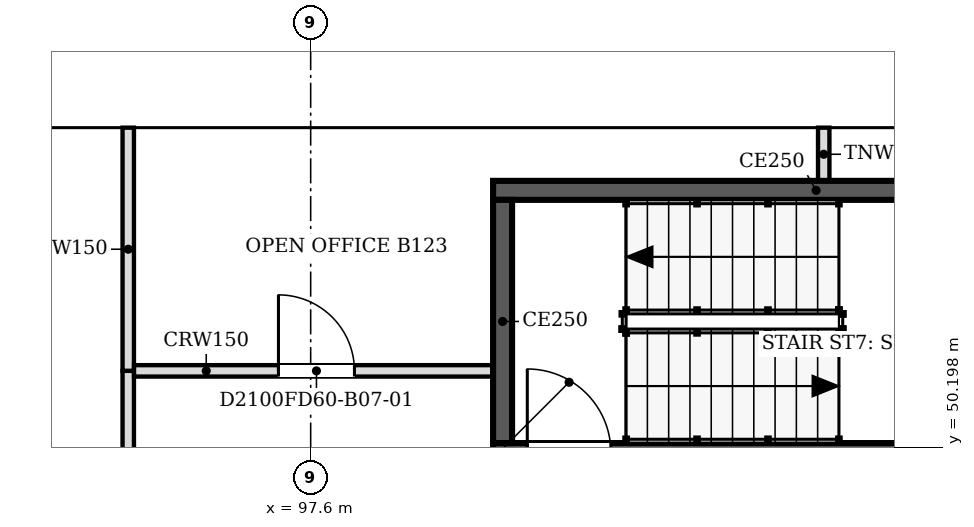
"""IFC4 building model, lengths in metres.
Left out: names, types, materials, properties, quantities, classifications, styles, units other than length and angle.
Written with IfcOpenShell. Run it as: python <this file> out.ifc"""

import sys

from ifc_helpers import new_model, si_unit, direction, frame, frame_2d, origin, place, context, subcontext, project, spatial, polyline, rectangle, outline, extrude, faceted_brep, source, transform, mapped, element, fill, save


model = new_model("IFC4")
c1 = context("Model", 3, precision=1e-05, world=origin(), true_north=direction((0.0, 1.0)))
c2 = subcontext(c1, "Body", "Model", "MODEL_VIEW")
j1 = project(units=[si_unit("LENGTHUNIT", "METRE"), si_unit("PLANEANGLEUNIT", "RADIAN")], contexts=[c1])
p1 = place(None, origin())
s1 = spatial("IfcSite", under=j1, at=p1, CompositionType="ELEMENT")
p2 = place(p1, origin())
s2 = spatial("IfcBuilding", under=s1, at=p2, CompositionType="ELEMENT")
p3 = place(p2, frame((0.0, 0.0, 68.6)))
s3 = spatial("IfcBuildingStorey", under=s2, at=p3, CompositionType="ELEMENT", Elevation=68.6)
m1 = source(origin(), c2, "Body", "SweptSolid", [
    extrude(outline(polyline([(6.1, 0.0), (3.05, 3.8), (0.0, 0.0), (6.1, 0.0)])), frame((0.0, 0.25, 0.0), z_axis=(0.0, -1.0, 0.0), x_axis=(1.0, 0.0, 0.0)), (0.0, 0.0, 1.0), 0.5),
])
p4 = place(p3, frame((106.75, 54.65, 0.0), z_axis=(0.0, 0.0, 1.0), x_axis=(-1.0, 0.0, 0.0)))
e1 = element("IfcWall", 1, at=p4, inside=s3, PredefinedType="SOLIDWALL", context=c2, shape_type="MappedRepresentation", body=[
    mapped(m1, transform((0.0, 0.0, 0.0), scale=1.0)),
])
m2 = source(origin(), c2, "Body", "SweptSolid", [
    extrude(outline(polyline([(5.579, 0.25), (3.05, 3.4), (0.521, 0.25), (5.579, 0.25)])), frame((0.0, 0.26, 0.0), z_axis=(0.0, -1.0, 0.0), x_axis=(1.0, 0.0, 0.0)), (0.0, 0.0, 1.0), 0.52),
])
p5 = place(p4, origin())
e2 = element("IfcOpeningElement", 2, at=p5, cuts=e1, PredefinedType="OPENING", context=c2, shape_type="MappedRepresentation", body=[
    mapped(m2, transform((0.0, 0.0, 0.0), scale=1.0)),
])
m3 = source(origin(), c2, "Body", "Brep", [
    faceted_brep([(6.1, -0.25, 0.0), (3.05, -0.25, 3.8), (0.0, -0.25, 0.0), (6.1, -0.25, 0.0), (0.0, 0.25, 0.0), (3.05, 0.25, 3.8), (6.1, 0.25, 0.0), (6.1, 0.25, 0.0)], [[[0, 1, 2, 3]], [[4, 5, 6, 7]], [[6, 5, 1, 0]], [[5, 4, 2, 1]], [[4, 7, 3, 2]], [[3, 7, 6, 0]]]),
])
p6 = place(p3, frame((100.65, 54.65, 0.0), z_axis=(0.0, 0.0, 1.0), x_axis=(-1.0, 0.0, 0.0)))
e3 = element("IfcWall", 3, at=p6, inside=s3, PredefinedType="SOLIDWALL", context=c2, shape_type="MappedRepresentation", body=[
    mapped(m3, transform((0.0, 0.0, 0.0), scale=1.0)),
])
p7 = place(p6, origin())
e4 = element("IfcOpeningElement", 4, at=p7, cuts=e3, PredefinedType="OPENING", context=c2, shape_type="MappedRepresentation", body=[
    mapped(m2, transform((0.0, 0.0, 0.0), scale=1.0)),
])
m4 = source(origin(), c2, "Body", "Brep", [
    faceted_brep([(3.05, -0.25, 3.74), (3.003, -0.25, 3.8), (0.0, -0.25, 0.0), (3.05, -0.25, 0.0), (0.0, 0.25, 0.0), (2.957, 0.25, 3.741), (2.957, 0.25, 0.0), (3.003, 0.0, 3.8)], [[[0, 1, 2, 3]], [[4, 5, 6]], [[7, 1, 0]], [[5, 4, 2, 1, 7]], [[4, 6, 3, 2]], [[3, 6, 5, 7, 0]]]),
])
p8 = place(p3, frame((94.55, 54.65, 0.0), z_axis=(0.0, 0.0, 1.0), x_axis=(-1.0, 0.0, 0.0)))
e5 = element("IfcWall", 5, at=p8, inside=s3, PredefinedType="SOLIDWALL", context=c2, shape_type="MappedRepresentation", body=[
    mapped(m4, transform((0.0, 0.0, 0.0), scale=1.0)),
])
m5 = source(origin(), c2, "Body", "SweptSolid", [
    extrude(outline(polyline([(2.803, 3.144), (0.516, 0.25), (2.803, 0.25), (2.803, 3.144)])), frame((0.0, 0.26, 0.0), z_axis=(0.0, -1.0, 0.0), x_axis=(1.0, 0.0, 0.0)), (0.0, 0.0, 1.0), 0.52),
])
p9 = place(p8, origin())
e6 = element("IfcOpeningElement", 6, at=p9, cuts=e5, PredefinedType="OPENING", context=c2, shape_type="MappedRepresentation", body=[
    mapped(m5, transform((0.0, 0.0, 0.0), scale=1.0)),
])
p10 = place(p2, frame((0.0, 0.0, 72.4)))
s4 = spatial("IfcBuildingStorey", under=s2, at=p10, CompositionType="ELEMENT", Elevation=72.4)
m6 = source(origin(), c2, "Body", "SweptSolid", [
    extrude(outline(polyline([(3.05, 0.0), (6.1, 3.8), (3.05, 7.6), (0.0, 3.8), (3.05, 0.0)])), frame((0.0, 0.25, 0.0), z_axis=(0.0, -1.0, 0.0), x_axis=(1.0, 0.0, 0.0)), (0.0, 0.0, 1.0), 0.5),
])
p11 = place(p10, frame((109.8, 54.65, -3.8), z_axis=(0.0, 0.0, 1.0), x_axis=(-1.0, 0.0, 0.0)))
e7 = element("IfcWall", 7, at=p11, inside=s4, PredefinedType="SOLIDWALL", context=c2, shape_type="MappedRepresentation", body=[
    mapped(m6, transform((0.0, 0.0, 0.0), scale=1.0)),
])
m7 = source(origin(), c2, "Body", "SweptSolid", [
    extrude(outline(polyline([(3.05, 0.399), (5.78, 3.8), (3.05, 7.2), (0.321, 3.8), (3.05, 0.399)])), frame((0.0, 0.26, 0.0), z_axis=(0.0, -1.0, 0.0), x_axis=(1.0, 0.0, 0.0)), (0.0, 0.0, 1.0), 0.52),
])
p12 = place(p11, origin())
e8 = element("IfcOpeningElement", 8, at=p12, cuts=e7, PredefinedType="OPENING", context=c2, shape_type="MappedRepresentation", body=[
    mapped(m7, transform((0.0, 0.0, 0.0), scale=1.0)),
])
m8 = source(origin(), c2, "Body", "Brep", [
    faceted_brep([(3.05, -0.25, 0.0), (6.1, -0.25, 3.8), (6.1, -0.25, 3.8), (3.05, -0.25, 7.6), (0.0, -0.25, 3.8), (0.0, 0.25, 3.8), (3.05, 0.25, 7.6), (6.1, 0.25, 3.8), (6.1, 0.25, 3.8), (3.05, 0.25, 0.0)], [[[0, 1, 2, 3, 4]], [[5, 6, 7, 8, 9]], [[9, 8, 1, 0]], [[7, 6, 3, 2]], [[6, 5, 4, 3]], [[5, 9, 0, 4]], [[1, 8, 7, 2]]]),
])
p13 = place(p10, frame((103.7, 54.65, -3.8), z_axis=(0.0, 0.0, 1.0), x_axis=(-1.0, 0.0, 0.0)))
e9 = element("IfcWall", 9, at=p13, inside=s4, PredefinedType="SOLIDWALL", context=c2, shape_type="MappedRepresentation", body=[
    mapped(m8, transform((0.0, 0.0, 0.0), scale=1.0)),
])
p14 = place(p13, origin())
e10 = element("IfcOpeningElement", 10, at=p14, cuts=e9, PredefinedType="OPENING", context=c2, shape_type="MappedRepresentation", body=[
    mapped(m7, transform((0.0, 0.0, 0.0), scale=1.0)),
])
m9 = source(origin(), c2, "Body", "Brep", [
    faceted_brep([(3.05, -0.25, 0.0), (6.053, -0.25, 3.8), (3.05, -0.25, 7.6), (0.0, -0.25, 3.8), (0.0, 0.25, 3.8), (3.05, 0.25, 7.6), (6.007, 0.25, 3.859), (6.007, 0.25, 3.741), (3.05, 0.25, 0.0), (6.053, 0.0, 3.8)], [[[0, 1, 2, 3]], [[4, 5, 6, 7, 8]], [[8, 7, 9, 1, 0]], [[6, 5, 2, 1, 9]], [[5, 4, 3, 2]], [[4, 8, 0, 3]], [[9, 7, 6]]]),
])
p15 = place(p10, frame((97.6, 54.65, -3.8), z_axis=(0.0, 0.0, 1.0), x_axis=(-1.0, 0.0, 0.0)))
e11 = element("IfcWall", 11, at=p15, inside=s4, PredefinedType="SOLIDWALL", context=c2, shape_type="MappedRepresentation", body=[
    mapped(m9, transform((0.0, 0.0, 0.0), scale=1.0)),
])
m10 = source(origin(), c2, "Body", "SweptSolid", [
    extrude(outline(polyline([(3.049, 0.401), (5.735, 3.8), (3.049, 7.199), (0.321, 3.8), (3.049, 0.401)])), frame((0.0, 0.26, 0.0), z_axis=(0.0, -1.0, 0.0), x_axis=(1.0, 0.0, 0.0)), (0.0, 0.0, 1.0), 0.52),
])
p16 = place(p15, origin())
e12 = element("IfcOpeningElement", 12, at=p16, cuts=e11, PredefinedType="OPENING", context=c2, shape_type="MappedRepresentation", body=[
    mapped(m10, transform((0.0, 0.0, 0.0), scale=1.0)),
])
p17 = place(p3, frame((108.5, 50.125, 0.0), z_axis=(0.0, 0.0, 1.0), x_axis=(-1.0, 0.0, 0.0)))
e13 = element("IfcWall", 13, at=p17, inside=s3, PredefinedType="SOLIDWALL", context=c2, shape_type="SweptSolid", body=[
    extrude(rectangle(XDim=8.5, YDim=0.25, at=frame_2d((4.25, 0.0))), origin(), (0.0, 0.0, 1.0), 3.8),
])
m11 = source(origin(), c2, "Body", "SweptSolid", [
    extrude(rectangle(XDim=1.1, YDim=2.1, at=frame_2d((0.55, 1.05))), frame((0.0, 0.135, 0.0), z_axis=(0.0, -1.0, 0.0), x_axis=(1.0, 0.0, 0.0)), (0.0, 0.0, 1.0), 0.27),
])
p18 = place(p17, frame((6.95, 0.0, 0.0)))
e14 = element("IfcOpeningElement", 14, at=p18, cuts=e13, PredefinedType="OPENING", context=c2, shape_type="MappedRepresentation", body=[
    mapped(m11, transform((0.0, 0.0, 0.0), scale=1.0)),
])
p19 = place(p3, frame((100.125, 50.25, 0.0), z_axis=(0.0, 0.0, 1.0), x_axis=(0.0, 1.0, 0.0)))
e15 = element("IfcWall", 15, at=p19, inside=s3, PredefinedType="SOLIDWALL", context=c2, shape_type="SweptSolid", body=[
    extrude(rectangle(XDim=3.2, YDim=0.25, at=frame_2d((1.6, 0.0))), origin(), (0.0, 0.0, 1.0), 3.8),
])
p20 = place(p3, frame((100.0, 53.575, 0.0), z_axis=(0.0, 0.0, 1.0), x_axis=(1.0, 0.0, 0.0)))
e16 = element("IfcWall", 16, at=p20, inside=s3, PredefinedType="SOLIDWALL", context=c2, shape_type="SweptSolid", body=[
    extrude(rectangle(XDim=8.5, YDim=0.25, at=frame_2d((4.25, 0.0))), origin(), (0.0, 0.0, 1.0), 3.8),
])
p21 = place(p3, frame((95.2, 36.6, 0.0), z_axis=(0.0, 0.0, 1.0), x_axis=(0.0, 1.0, 0.0)))
e17 = element("IfcWall", 17, at=p21, inside=s3, PredefinedType="PARTITIONING", context=c2, shape_type="SweptSolid", body=[
    extrude(rectangle(XDim=14.6, YDim=0.15, at=frame_2d((7.3, 0.0))), origin(), (0.0, 0.0, 1.0), 3.067),
])
m12 = source(origin(), c2, "Body", "SweptSolid", [
    extrude(rectangle(XDim=0.9, YDim=2.1, at=frame_2d((0.45, 1.05))), frame((0.0, 0.085, 0.0), z_axis=(0.0, -1.0, 0.0), x_axis=(1.0, 0.0, 0.0)), (0.0, 0.0, 1.0), 0.17),
])
p22 = place(p21, frame((11.301, 0.0, 0.0)))
e18 = element("IfcOpeningElement", 18, at=p22, cuts=e17, PredefinedType="OPENING", context=c2, shape_type="MappedRepresentation", body=[
    mapped(m12, transform((0.0, 0.0, 0.0), scale=1.0)),
])
p23 = place(p3, frame((95.2, 51.201, 0.0), z_axis=(0.0, 0.0, 1.0), x_axis=(0.0, 1.0, 0.0)))
e19 = element("IfcWall", 19, at=p23, inside=s3, PredefinedType="PARTITIONING", context=c2, shape_type="SweptSolid", body=[
    extrude(rectangle(XDim=3.199, YDim=0.15, at=frame_2d((1.6, 0.0))), origin(), (0.0, 0.0, 1.0), 3.067),
])
p24 = place(p3, frame((95.276, 51.2, 0.0), z_axis=(0.0, 0.0, 1.0), x_axis=(1.0, 0.0, 0.0)))
e20 = element("IfcWall", 20, at=p24, inside=s3, PredefinedType="PARTITIONING", context=c2, shape_type="SweptSolid", body=[
    extrude(rectangle(XDim=4.724, YDim=0.15, at=frame_2d((2.362, 0.0))), origin(), (0.0, 0.0, 1.0), 3.067),
])
m13 = source(origin(), c2, "Body", "SweptSolid", [
    extrude(rectangle(XDim=1.0, YDim=2.1, at=frame_2d((0.5, 1.05))), frame((0.0, 0.085, 0.0), z_axis=(0.0, -1.0, 0.0), x_axis=(1.0, 0.0, 0.0)), (0.0, 0.0, 1.0), 0.17),
])
p25 = place(p24, frame((1.9, 0.0, 0.0)))
e21 = element("IfcOpeningElement", 21, at=p25, cuts=e20, PredefinedType="OPENING", context=c2, shape_type="MappedRepresentation", body=[
    mapped(m13, transform((0.0, 0.0, 0.0), scale=1.0)),
])
p26 = place(p3, frame((104.35, 53.7, 0.0), z_axis=(0.0, 0.0, 1.0), x_axis=(0.0, 1.0, 0.0)))
e22 = element("IfcWall", 22, at=p26, inside=s3, PredefinedType="PARTITIONING", context=c2, shape_type="SweptSolid", body=[
    extrude(rectangle(XDim=0.7, YDim=0.15, at=frame_2d((0.35, 0.0))), origin(), (0.0, 0.0, 1.0), 3.067),
])
m14 = source(origin(), c2, "Body", "SweptSolid", [
    extrude(rectangle(XDim=1.0, YDim=2.1, at=frame_2d((0.5, 1.05))), frame((0.0, 0.025, 0.0), z_axis=(0.0, -1.0, 0.0), x_axis=(1.0, 0.0, 0.0)), (0.0, 0.0, 1.0), 0.05),
])
p27 = place(p25, origin())
e23 = element("IfcDoor", 23, at=p27, inside=s3, OperationType="SINGLE_SWING_LEFT", PredefinedType="DOOR", context=c2, shape_type="MappedRepresentation", body=[
    mapped(m14, transform((0.0, 0.0, 0.0), scale=1.0)),
])
fill(e21, e23)
save(model, sys.argv[1])
